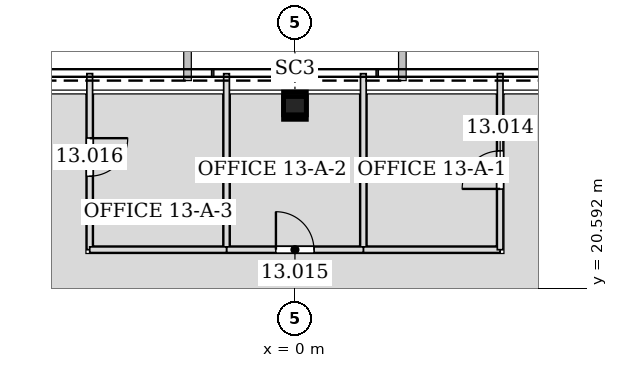
"""IFC4 building model, lengths in metres.
Left out: names, types, materials, properties, quantities, classifications, styles, units other than length and angle.
Written with IfcOpenShell. Run it as: python <this file> out.ifc"""

import sys

from ifc_helpers import new_model, si_unit, direction, frame, frame_2d, origin, origin_2d, place, context, subcontext, project, spatial, rectangle, hollow_rectangle, extrude, element, fill, save


model = new_model("IFC4")
c1 = context("Model", 3, precision=1e-05, world=origin(), true_north=direction((0.0, 1.0)))
c2 = subcontext(c1, "Body", "Model", "MODEL_VIEW")
j1 = project(units=[si_unit("LENGTHUNIT", "METRE"), si_unit("PLANEANGLEUNIT", "RADIAN")], contexts=[c1])
p1 = place(None, origin())
s1 = spatial("IfcSite", under=j1, at=p1, CompositionType="ELEMENT")
p2 = place(p1, origin())
s2 = spatial("IfcBuilding", under=s1, at=p2, CompositionType="ELEMENT")
p3 = place(p2, frame((0.0, 0.0, 62.4)))
s3 = spatial("IfcBuildingStorey", under=s2, at=p3, CompositionType="ELEMENT", Elevation=62.4)
p4 = place(p3, frame((0.0, 25.449, 0.0), z_axis=(0.0, -0.028237979375, 0.999601228751), x_axis=(1.0, 0.0, 0.0)))
e1 = element("IfcColumn", 1, at=p4, inside=s3, PredefinedType="COLUMN", context=c2, shape_type="SweptSolid", body=[
    extrude(hollow_rectangle(XDim=0.6, YDim=0.6, WallThickness=0.032, at=origin_2d()), origin(), (0.0, 0.0, 1.0), 4.202),
])
p5 = place(p3, frame((1.8, 26.231, 0.0), z_axis=(0.0, 0.0, 1.0), x_axis=(0.0, -1.0, 0.0)))
e2 = element("IfcWall", 2, at=p5, inside=s3, PredefinedType="PARTITIONING", context=c2, shape_type="SweptSolid", body=[
    extrude(rectangle(XDim=4.632, YDim=0.15, at=frame_2d((2.316, 0.0))), origin(), (0.0, 0.0, 1.0), 3.423),
])
p6 = place(p3, frame((1.8, 21.6, 0.0), z_axis=(0.0, 0.0, 1.0), x_axis=(1.0, 0.0, 0.0)))
e3 = element("IfcWall", 3, at=p6, inside=s3, PredefinedType="PARTITIONING", context=c2, shape_type="SweptSolid", body=[
    extrude(rectangle(XDim=3.6, YDim=0.15, at=frame_2d((1.8, 0.0))), origin(), (0.0, 0.0, 1.0), 4.035),
])
p7 = place(p3, frame((5.4, 21.6, 0.0), z_axis=(0.0, 0.0, 1.0), x_axis=(0.0, 1.0, 0.0)))
e4 = element("IfcWall", 4, at=p7, inside=s3, PredefinedType="PARTITIONING", context=c2, shape_type="SweptSolid", body=[
    extrude(rectangle(XDim=4.634, YDim=0.15, at=frame_2d((2.317, 0.0))), origin(), (0.0, 0.0, 1.0), 3.423),
])
p8 = place(p7, frame((1.6, 0.0, 0.0)))
e5 = element("IfcOpeningElement", 5, at=p8, cuts=e4, PredefinedType="OPENING", context=c2, shape_type="SweptSolid", body=[
    extrude(rectangle(XDim=1.0, YDim=2.1, at=frame_2d((0.5, 1.05))), frame((0.0, 0.085, 0.0), z_axis=(0.0, -1.0, 0.0), x_axis=(1.0, 0.0, 0.0)), (0.0, 0.0, 1.0), 0.17),
])
p9 = place(p3, frame((-1.8, 26.231, 0.0), z_axis=(0.0, 0.0, 1.0), x_axis=(0.0, -1.0, 0.0)))
e6 = element("IfcWall", 6, at=p9, inside=s3, PredefinedType="PARTITIONING", context=c2, shape_type="SweptSolid", body=[
    extrude(rectangle(XDim=4.632, YDim=0.15, at=frame_2d((2.316, 0.0))), origin(), (0.0, 0.0, 1.0), 3.423),
])
p10 = place(p3, frame((-1.8, 21.6, 0.0), z_axis=(0.0, 0.0, 1.0), x_axis=(1.0, 0.0, 0.0)))
e7 = element("IfcWall", 7, at=p10, inside=s3, PredefinedType="PARTITIONING", context=c2, shape_type="SweptSolid", body=[
    extrude(rectangle(XDim=3.6, YDim=0.15, at=frame_2d((1.8, 0.0))), origin(), (0.0, 0.0, 1.0), 2.984),
])
p11 = place(p10, frame((1.3, 0.0, 0.0)))
e8 = element("IfcOpeningElement", 8, at=p11, cuts=e7, PredefinedType="OPENING", context=c2, shape_type="SweptSolid", body=[
    extrude(rectangle(XDim=1.0, YDim=2.1, at=frame_2d((0.5, 1.05))), frame((0.0, 0.085, 0.0), z_axis=(0.0, -1.0, 0.0), x_axis=(1.0, 0.0, 0.0)), (0.0, 0.0, 1.0), 0.17),
])
p12 = place(p3, frame((-5.4, 26.233, 0.0), z_axis=(0.0, 0.0, 1.0), x_axis=(0.0, -1.0, 0.0)))
e9 = element("IfcWall", 9, at=p12, inside=s3, PredefinedType="PARTITIONING", context=c2, shape_type="SweptSolid", body=[
    extrude(rectangle(XDim=4.634, YDim=0.15, at=frame_2d((2.317, 0.0))), origin(), (0.0, 0.0, 1.0), 3.423),
])
p13 = place(p12, frame((1.699, 0.0, 0.0)))
e10 = element("IfcOpeningElement", 10, at=p13, cuts=e9, PredefinedType="OPENING", context=c2, shape_type="SweptSolid", body=[
    extrude(rectangle(XDim=1.0, YDim=2.1, at=frame_2d((0.5, 1.05))), frame((0.0, 0.085, 0.0), z_axis=(0.0, -1.0, 0.0), x_axis=(1.0, 0.0, 0.0)), (0.0, 0.0, 1.0), 0.17),
])
p14 = place(p3, frame((-5.4, 21.6, 0.0), z_axis=(0.0, 0.0, 1.0), x_axis=(1.0, 0.0, 0.0)))
e11 = element("IfcWall", 11, at=p14, inside=s3, PredefinedType="PARTITIONING", context=c2, shape_type="SweptSolid", body=[
    extrude(rectangle(XDim=3.6, YDim=0.15, at=frame_2d((1.8, 0.0))), origin(), (0.0, 0.0, 1.0), 4.035),
])
p15 = place(p8, origin())
e12 = element("IfcDoor", 12, at=p15, inside=s3, OperationType="SINGLE_SWING_LEFT", PredefinedType="DOOR", context=c2, shape_type="SweptSolid", body=[
    extrude(rectangle(XDim=1.0, YDim=2.1, at=frame_2d((0.5, 1.05))), frame((0.0, 0.025, 0.0), z_axis=(0.0, -1.0, 0.0), x_axis=(1.0, 0.0, 0.0)), (0.0, 0.0, 1.0), 0.05),
])
fill(e5, e12)
p16 = place(p11, origin())
e13 = element("IfcDoor", 13, at=p16, inside=s3, OperationType="SINGLE_SWING_LEFT", PredefinedType="DOOR", context=c2, shape_type="SweptSolid", body=[
    extrude(rectangle(XDim=1.0, YDim=2.1, at=frame_2d((0.5, 1.05))), frame((0.0, 0.025, 0.0), z_axis=(0.0, -1.0, 0.0), x_axis=(1.0, 0.0, 0.0)), (0.0, 0.0, 1.0), 0.05),
])
fill(e8, e13)
p17 = place(p13, origin())
e14 = element("IfcDoor", 14, at=p17, inside=s3, OperationType="SINGLE_SWING_LEFT", PredefinedType="DOOR", context=c2, shape_type="SweptSolid", body=[
    extrude(rectangle(XDim=1.0, YDim=2.1, at=frame_2d((0.5, 1.05))), frame((0.0, 0.025, 0.0), z_axis=(0.0, -1.0, 0.0), x_axis=(1.0, 0.0, 0.0)), (0.0, 0.0, 1.0), 0.05),
])
fill(e10, e14)
save(model, sys.argv[1])
